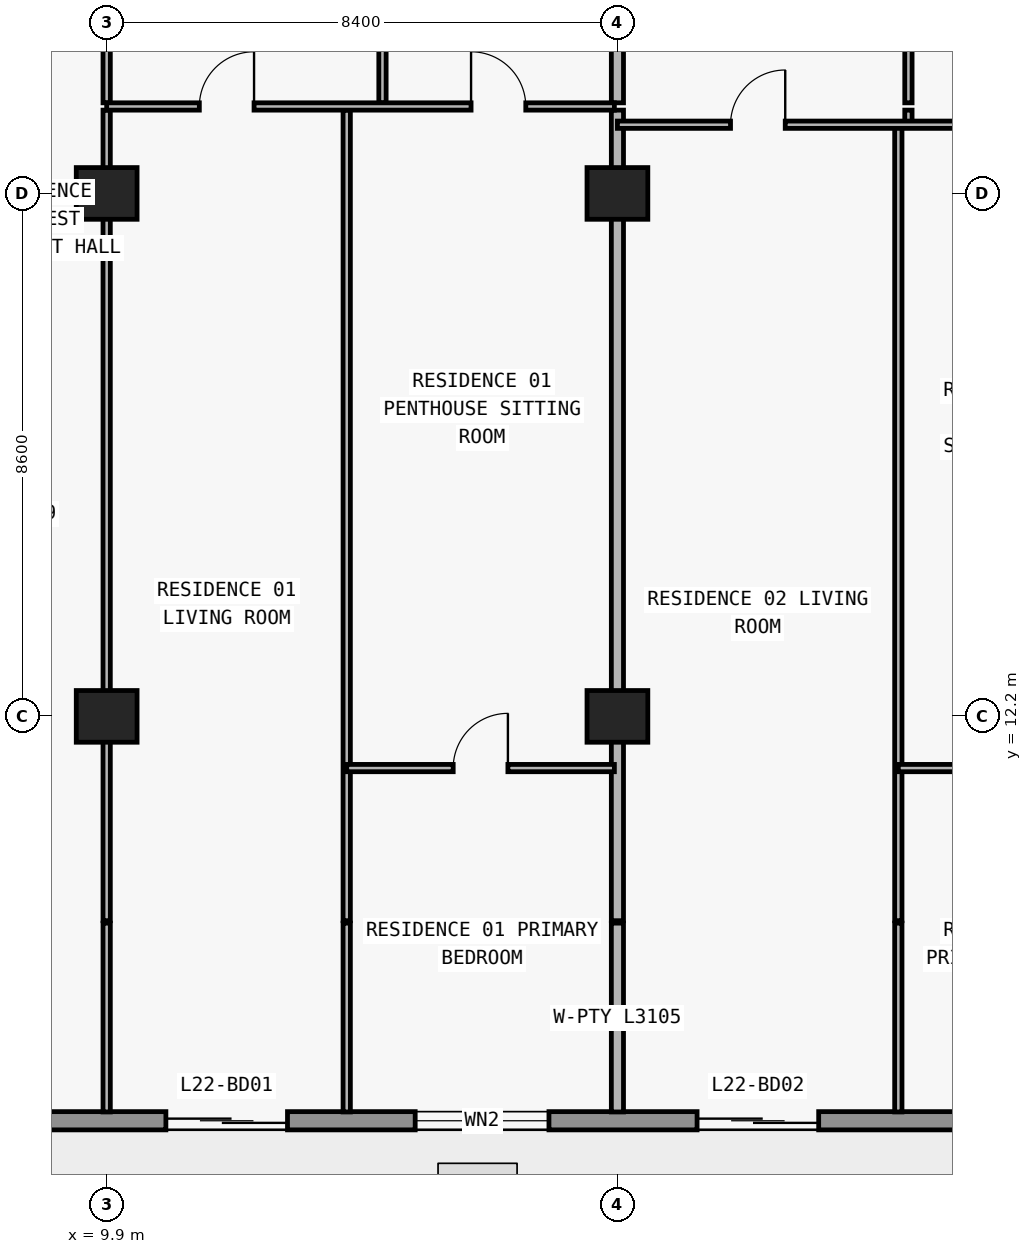
"""IFC4 building model, lengths in metres.
Left out: names, types, materials, properties, quantities, classifications, styles, units other than length and angle.
Written with IfcOpenShell. Run it as: python <this file> out.ifc"""

import sys

from ifc_helpers import new_model, si_unit, direction, frame, frame_2d, origin, origin_2d, place, context, subcontext, project, spatial, rectangle, extrude, element, fill, save


model = new_model("IFC4")
c1 = context("Model", 3, precision=1e-05, world=origin(), true_north=direction((0.0, 1.0)))
c2 = subcontext(c1, "Body", "Model", "MODEL_VIEW")
j1 = project(units=[si_unit("LENGTHUNIT", "METRE"), si_unit("PLANEANGLEUNIT", "RADIAN")], contexts=[c1])
p1 = place(None, origin())
s1 = spatial("IfcSite", under=j1, at=p1, CompositionType="ELEMENT")
p2 = place(p1, origin())
s2 = spatial("IfcBuilding", under=s1, at=p2, CompositionType="ELEMENT")
p3 = place(p2, frame((0.0, 0.0, 84.6)))
s3 = spatial("IfcBuildingStorey", under=s2, at=p3, CompositionType="ELEMENT", Elevation=84.6)
for number, where, z_axis, x_axis in (
    (1, (9.9, 12.2, 0.0), (0.0, 0.0, 1.0), (1.0, 0.0, 0.0)),
    (2, (18.3, 12.2, 0.0), (0.0, 0.0, 1.0), (1.0, 0.0, 0.0)),
    (3, (9.9, 20.8, 0.0), (0.0, 0.0, 1.0), (1.0, 0.0, 0.0)),
    (4, (18.3, 20.8, 0.0), (0.0, 0.0, 1.0), (1.0, 0.0, 0.0)),
):
    element("IfcColumn", number, at=place(p3, frame(where, z_axis=z_axis, x_axis=x_axis)), inside=s3, PredefinedType="COLUMN", context=c2, shape_type="SweptSolid", body=[
        extrude(rectangle(XDim=1.0, YDim=0.85, at=origin_2d()), origin(), (0.0, 0.0, 1.0), 3.05),
    ])
p4 = place(p3, frame((70.1, 5.55, 0.0), z_axis=(0.0, 0.0, 1.0), x_axis=(-1.0, 0.0, 0.0)))
e5 = element("IfcWall", 5, at=p4, inside=s3, PredefinedType="STANDARD", context=c2, shape_type="SweptSolid", body=[
    extrude(rectangle(XDim=62.4, YDim=0.3, at=frame_2d((31.2, 0.0))), origin(), (0.0, 0.0, 1.0), 3.05),
])
p5 = place(p4, frame((57.226, 0.0, 0.0)))
e6 = element("IfcOpeningElement", 6, at=p5, cuts=e5, PredefinedType="OPENING", context=c2, shape_type="SweptSolid", body=[
    extrude(rectangle(XDim=2.0, YDim=2.3, at=frame_2d((1.0, 1.15))), frame((0.0, 0.16, 0.0), z_axis=(0.0, -1.0, 0.0), x_axis=(1.0, 0.0, 0.0)), (0.0, 0.0, 1.0), 0.32),
])
p6 = place(p4, frame((52.926, 0.0, 0.85)))
e7 = element("IfcOpeningElement", 7, at=p6, cuts=e5, PredefinedType="OPENING", context=c2, shape_type="SweptSolid", body=[
    extrude(rectangle(XDim=2.2, YDim=1.55, at=frame_2d((1.1, 0.775))), frame((0.0, 0.16, 0.0), z_axis=(0.0, -1.0, 0.0), x_axis=(1.0, 0.0, 0.0)), (0.0, 0.0, 1.0), 0.32),
])
p7 = place(p4, frame((48.49, 0.0, 0.0)))
e8 = element("IfcOpeningElement", 8, at=p7, cuts=e5, PredefinedType="OPENING", context=c2, shape_type="SweptSolid", body=[
    extrude(rectangle(XDim=2.0, YDim=2.3, at=frame_2d((1.0, 1.15))), frame((0.0, 0.16, 0.0), z_axis=(0.0, -1.0, 0.0), x_axis=(1.0, 0.0, 0.0)), (0.0, 0.0, 1.0), 0.32),
])
p8 = place(p4, frame((44.39, 0.0, 0.85)))
e9 = element("IfcOpeningElement", 9, at=p8, cuts=e5, PredefinedType="OPENING", context=c2, shape_type="SweptSolid", body=[
    extrude(rectangle(XDim=1.8, YDim=1.55, at=frame_2d((0.9, 0.775))), frame((0.0, 0.16, 0.0), z_axis=(0.0, -1.0, 0.0), x_axis=(1.0, 0.0, 0.0)), (0.0, 0.0, 1.0), 0.32),
])
p9 = place(p4, frame((40.426, 0.0, 0.0)))
e10 = element("IfcOpeningElement", 10, at=p9, cuts=e5, PredefinedType="OPENING", context=c2, shape_type="SweptSolid", body=[
    extrude(rectangle(XDim=2.0, YDim=2.3, at=frame_2d((1.0, 1.15))), frame((0.0, 0.16, 0.0), z_axis=(0.0, -1.0, 0.0), x_axis=(1.0, 0.0, 0.0)), (0.0, 0.0, 1.0), 0.32),
])
p10 = place(p4, frame((36.126, 0.0, 0.85)))
e11 = element("IfcOpeningElement", 11, at=p10, cuts=e5, PredefinedType="OPENING", context=c2, shape_type="SweptSolid", body=[
    extrude(rectangle(XDim=2.2, YDim=1.55, at=frame_2d((1.1, 0.775))), frame((0.0, 0.16, 0.0), z_axis=(0.0, -1.0, 0.0), x_axis=(1.0, 0.0, 0.0)), (0.0, 0.0, 1.0), 0.32),
])
p11 = place(p4, frame((32.09, 0.0, 0.0)))
e12 = element("IfcOpeningElement", 12, at=p11, cuts=e5, PredefinedType="OPENING", context=c2, shape_type="SweptSolid", body=[
    extrude(rectangle(XDim=2.0, YDim=2.3, at=frame_2d((1.0, 1.15))), frame((0.0, 0.16, 0.0), z_axis=(0.0, -1.0, 0.0), x_axis=(1.0, 0.0, 0.0)), (0.0, 0.0, 1.0), 0.32),
])
p12 = place(p4, frame((28.21, 0.0, 0.65)))
e13 = element("IfcOpeningElement", 13, at=p12, cuts=e5, PredefinedType="OPENING", context=c2, shape_type="SweptSolid", body=[
    extrude(rectangle(XDim=2.6, YDim=1.85, at=frame_2d((1.3, 0.925))), frame((0.0, 0.16, 0.0), z_axis=(0.0, -1.0, 0.0), x_axis=(1.0, 0.0, 0.0)), (0.0, 0.0, 1.0), 0.32),
])
p13 = place(p4, frame((22.1, 0.0, 0.85)))
e14 = element("IfcOpeningElement", 14, at=p13, cuts=e5, PredefinedType="OPENING", context=c2, shape_type="SweptSolid", body=[
    extrude(rectangle(XDim=2.2, YDim=1.55, at=frame_2d((1.1, 0.775))), frame((0.0, 0.16, 0.0), z_axis=(0.0, -1.0, 0.0), x_axis=(1.0, 0.0, 0.0)), (0.0, 0.0, 1.0), 0.32),
])
p14 = place(p4, frame((16.026, 0.0, 0.0)))
e15 = element("IfcOpeningElement", 15, at=p14, cuts=e5, PredefinedType="OPENING", context=c2, shape_type="SweptSolid", body=[
    extrude(rectangle(XDim=2.0, YDim=2.3, at=frame_2d((1.0, 1.15))), frame((0.0, 0.16, 0.0), z_axis=(0.0, -1.0, 0.0), x_axis=(1.0, 0.0, 0.0)), (0.0, 0.0, 1.0), 0.32),
])
p15 = place(p4, frame((11.726, 0.0, 0.85)))
e16 = element("IfcOpeningElement", 16, at=p15, cuts=e5, PredefinedType="OPENING", context=c2, shape_type="SweptSolid", body=[
    extrude(rectangle(XDim=2.2, YDim=1.55, at=frame_2d((1.1, 0.775))), frame((0.0, 0.16, 0.0), z_axis=(0.0, -1.0, 0.0), x_axis=(1.0, 0.0, 0.0)), (0.0, 0.0, 1.0), 0.32),
])
p16 = place(p4, frame((7.29, 0.0, 0.0)))
e17 = element("IfcOpeningElement", 17, at=p16, cuts=e5, PredefinedType="OPENING", context=c2, shape_type="SweptSolid", body=[
    extrude(rectangle(XDim=2.0, YDim=2.3, at=frame_2d((1.0, 1.15))), frame((0.0, 0.16, 0.0), z_axis=(0.0, -1.0, 0.0), x_axis=(1.0, 0.0, 0.0)), (0.0, 0.0, 1.0), 0.32),
])
p17 = place(p4, frame((3.19, 0.0, 0.85)))
e18 = element("IfcOpeningElement", 18, at=p17, cuts=e5, PredefinedType="OPENING", context=c2, shape_type="SweptSolid", body=[
    extrude(rectangle(XDim=1.8, YDim=1.55, at=frame_2d((0.9, 0.775))), frame((0.0, 0.16, 0.0), z_axis=(0.0, -1.0, 0.0), x_axis=(1.0, 0.0, 0.0)), (0.0, 0.0, 1.0), 0.32),
])
p18 = place(p3, frame((9.9, 5.695, 0.0), z_axis=(0.0, 0.0, 1.0), x_axis=(0.0, 1.0, 0.0)))
e19 = element("IfcWall", 19, at=p18, inside=s3, PredefinedType="PARTITIONING", context=c2, shape_type="SweptSolid", body=[
    extrude(rectangle(XDim=3.105, YDim=0.12, at=frame_2d((1.552, 0.0))), origin(), (0.0, 0.0, 1.0), 3.05),
])
p19 = place(p3, frame((9.9, 8.84, 0.0), z_axis=(0.0, 0.0, 1.0), x_axis=(0.0, 1.0, 0.0)))
e20 = element("IfcWall", 20, at=p19, inside=s3, PredefinedType="PARTITIONING", context=c2, shape_type="SweptSolid", body=[
    extrude(rectangle(XDim=13.33, YDim=0.12, at=frame_2d((6.665, 0.0))), origin(), (0.0, 0.0, 1.0), 2.174),
])
p20 = place(p3, frame((9.9, 22.29, 0.0), z_axis=(0.0, 0.0, 1.0), x_axis=(0.0, 1.0, 0.0)))
e21 = element("IfcWall", 21, at=p20, inside=s3, PredefinedType="PARTITIONING", context=c2, shape_type="SweptSolid", body=[
    extrude(rectangle(XDim=4.69, YDim=0.12, at=frame_2d((2.345, 0.0))), origin(), (0.0, 0.0, 1.0), 2.174),
])
p21 = place(p20, frame((1.895, 0.0, 0.0)))
e22 = element("IfcOpeningElement", 22, at=p21, cuts=e21, PredefinedType="OPENING", context=c2, shape_type="SweptSolid", body=[
    extrude(rectangle(XDim=0.9, YDim=2.124, at=frame_2d((0.45, 1.062))), frame((0.0, 0.07, 0.0), z_axis=(0.0, -1.0, 0.0), x_axis=(1.0, 0.0, 0.0)), (0.0, 0.0, 1.0), 0.14),
])
p22 = place(p3, frame((13.848, 5.695, 0.0), z_axis=(0.0, 0.0, 1.0), x_axis=(0.0, 1.0, 0.0)))
e23 = element("IfcWall", 23, at=p22, inside=s3, PredefinedType="PARTITIONING", context=c2, shape_type="SweptSolid", body=[
    extrude(rectangle(XDim=3.105, YDim=0.12, at=frame_2d((1.552, 0.0))), origin(), (0.0, 0.0, 1.0), 3.05),
])
p23 = place(p3, frame((13.848, 8.84, 0.0), z_axis=(0.0, 0.0, 1.0), x_axis=(0.0, 1.0, 0.0)))
e24 = element("IfcWall", 24, at=p23, inside=s3, PredefinedType="PARTITIONING", context=c2, shape_type="SweptSolid", body=[
    extrude(rectangle(XDim=13.33, YDim=0.12, at=frame_2d((6.665, 0.0))), origin(), (0.0, 0.0, 1.0), 3.05),
])
p24 = place(p3, frame((14.436, 22.29, 0.0), z_axis=(0.0, 0.0, 1.0), x_axis=(0.0, 1.0, 0.0)))
e25 = element("IfcWall", 25, at=p24, inside=s3, PredefinedType="PARTITIONING", context=c2, shape_type="SweptSolid", body=[
    extrude(rectangle(XDim=4.69, YDim=0.12, at=frame_2d((2.345, 0.0))), origin(), (0.0, 0.0, 1.0), 3.05),
])
p25 = place(p24, frame((1.895, 0.0, 0.0)))
e26 = element("IfcOpeningElement", 26, at=p25, cuts=e25, PredefinedType="OPENING", context=c2, shape_type="SweptSolid", body=[
    extrude(rectangle(XDim=0.9, YDim=2.15, at=frame_2d((0.45, 1.075))), frame((0.0, 0.07, 0.0), z_axis=(0.0, -1.0, 0.0), x_axis=(1.0, 0.0, 0.0)), (0.0, 0.0, 1.0), 0.14),
])
p26 = place(p3, frame((18.3, 5.695, 0.0), z_axis=(0.0, 0.0, 1.0), x_axis=(0.0, 1.0, 0.0)))
e27 = element("IfcWall", 27, at=p26, inside=s3, PredefinedType="PARTITIONING", context=c2, shape_type="SweptSolid", body=[
    extrude(rectangle(XDim=3.105, YDim=0.2, at=frame_2d((1.552, 0.0))), origin(), (0.0, 0.0, 1.0), 3.05),
])
p27 = place(p3, frame((18.3, 8.84, 0.0), z_axis=(0.0, 0.0, 1.0), x_axis=(0.0, 1.0, 0.0)))
e28 = element("IfcWall", 28, at=p27, inside=s3, PredefinedType="PARTITIONING", context=c2, shape_type="SweptSolid", body=[
    extrude(rectangle(XDim=13.33, YDim=0.2, at=frame_2d((6.665, 0.0))), origin(), (0.0, 0.0, 1.0), 2.174),
])
p28 = place(p3, frame((18.3, 22.29, 0.0), z_axis=(0.0, 0.0, 1.0), x_axis=(0.0, 1.0, 0.0)))
e29 = element("IfcWall", 29, at=p28, inside=s3, PredefinedType="PARTITIONING", context=c2, shape_type="SweptSolid", body=[
    extrude(rectangle(XDim=4.69, YDim=0.2, at=frame_2d((2.345, 0.0))), origin(), (0.0, 0.0, 1.0), 2.174),
])
p29 = place(p3, frame((22.92, 5.695, 0.0), z_axis=(0.0, 0.0, 1.0), x_axis=(0.0, 1.0, 0.0)))
e30 = element("IfcWall", 30, at=p29, inside=s3, PredefinedType="PARTITIONING", context=c2, shape_type="SweptSolid", body=[
    extrude(rectangle(XDim=3.105, YDim=0.12, at=frame_2d((1.552, 0.0))), origin(), (0.0, 0.0, 1.0), 3.05),
])
p30 = place(p3, frame((22.92, 8.84, 0.0), z_axis=(0.0, 0.0, 1.0), x_axis=(0.0, 1.0, 0.0)))
e31 = element("IfcWall", 31, at=p30, inside=s3, PredefinedType="PARTITIONING", context=c2, shape_type="SweptSolid", body=[
    extrude(rectangle(XDim=13.09, YDim=0.12, at=frame_2d((6.545, 0.0))), origin(), (0.0, 0.0, 1.0), 3.05),
])
p31 = place(p3, frame((23.086, 21.935, 0.0), z_axis=(0.0, 0.0, 1.0), x_axis=(0.0, 1.0, 0.0)))
e32 = element("IfcWall", 32, at=p31, inside=s3, PredefinedType="PARTITIONING", context=c2, shape_type="SweptSolid", body=[
    extrude(rectangle(XDim=0.235, YDim=0.12, at=frame_2d((0.117, 0.0))), origin(), (0.0, 0.0, 1.0), 3.05),
])
p32 = place(p3, frame((23.086, 22.29, 0.0), z_axis=(0.0, 0.0, 1.0), x_axis=(0.0, 1.0, 0.0)))
e33 = element("IfcWall", 33, at=p32, inside=s3, PredefinedType="PARTITIONING", context=c2, shape_type="SweptSolid", body=[
    extrude(rectangle(XDim=4.69, YDim=0.12, at=frame_2d((2.345, 0.0))), origin(), (0.0, 0.0, 1.0), 3.05),
])
p33 = place(p32, frame((1.895, 0.0, 0.0)))
e34 = element("IfcOpeningElement", 34, at=p33, cuts=e33, PredefinedType="OPENING", context=c2, shape_type="SweptSolid", body=[
    extrude(rectangle(XDim=0.9, YDim=2.15, at=frame_2d((0.45, 1.075))), frame((0.0, 0.07, 0.0), z_axis=(0.0, -1.0, 0.0), x_axis=(1.0, 0.0, 0.0)), (0.0, 0.0, 1.0), 0.14),
])
p34 = place(p3, frame((13.848, 11.35, 0.0), z_axis=(0.0, 0.0, 1.0), x_axis=(1.0, 0.0, 0.0)))
e35 = element("IfcWall", 35, at=p34, inside=s3, PredefinedType="PARTITIONING", context=c2, shape_type="SweptSolid", body=[
    extrude(rectangle(XDim=4.402, YDim=0.12, at=frame_2d((2.201, 0.0))), origin(), (0.0, 0.0, 1.0), 3.05),
])
p35 = place(p34, frame((1.751, 0.0, 0.0)))
e36 = element("IfcOpeningElement", 36, at=p35, cuts=e35, PredefinedType="OPENING", context=c2, shape_type="SweptSolid", body=[
    extrude(rectangle(XDim=0.9, YDim=2.15, at=frame_2d((0.45, 1.075))), frame((0.0, 0.07, 0.0), z_axis=(0.0, -1.0, 0.0), x_axis=(1.0, 0.0, 0.0)), (0.0, 0.0, 1.0), 0.14),
])
p36 = place(p3, frame((22.92, 11.35, 0.0), z_axis=(0.0, 0.0, 1.0), x_axis=(1.0, 0.0, 0.0)))
e37 = element("IfcWall", 37, at=p36, inside=s3, PredefinedType="PARTITIONING", context=c2, shape_type="SweptSolid", body=[
    extrude(rectangle(XDim=3.73, YDim=0.12, at=frame_2d((1.865, 0.0))), origin(), (0.0, 0.0, 1.0), 3.05),
])
p37 = place(p36, frame((1.415, 0.0, 0.0)))
e38 = element("IfcOpeningElement", 38, at=p37, cuts=e37, PredefinedType="OPENING", context=c2, shape_type="SweptSolid", body=[
    extrude(rectangle(XDim=0.9, YDim=2.15, at=frame_2d((0.45, 1.075))), frame((0.0, 0.07, 0.0), z_axis=(0.0, -1.0, 0.0), x_axis=(1.0, 0.0, 0.0)), (0.0, 0.0, 1.0), 0.14),
])
p38 = place(p3, frame((18.3, 21.93, 0.0), z_axis=(0.0, 0.0, 1.0), x_axis=(1.0, 0.0, 0.0)))
e39 = element("IfcWall", 39, at=p38, inside=s3, PredefinedType="PARTITIONING", context=c2, shape_type="SweptSolid", body=[
    extrude(rectangle(XDim=8.13, YDim=0.12, at=frame_2d((4.065, 0.0))), origin(), (0.0, 0.0, 1.0), 3.05),
])
p39 = place(p38, frame((1.86, 0.0, 0.0)))
e40 = element("IfcOpeningElement", 40, at=p39, cuts=e39, PredefinedType="OPENING", context=c2, shape_type="SweptSolid", body=[
    extrude(rectangle(XDim=0.9, YDim=2.15, at=frame_2d((0.45, 1.075))), frame((0.0, 0.07, 0.0), z_axis=(0.0, -1.0, 0.0), x_axis=(1.0, 0.0, 0.0)), (0.0, 0.0, 1.0), 0.14),
])
p40 = place(p38, frame((6.008, 0.0, 0.0)))
e41 = element("IfcOpeningElement", 41, at=p40, cuts=e39, PredefinedType="OPENING", context=c2, shape_type="SweptSolid", body=[
    extrude(rectangle(XDim=0.9, YDim=2.15, at=frame_2d((0.45, 1.075))), frame((0.0, 0.07, 0.0), z_axis=(0.0, -1.0, 0.0), x_axis=(1.0, 0.0, 0.0)), (0.0, 0.0, 1.0), 0.14),
])
p41 = place(p3, frame((9.9, 22.23, 0.0), z_axis=(0.0, 0.0, 1.0), x_axis=(1.0, 0.0, 0.0)))
e42 = element("IfcWall", 42, at=p41, inside=s3, PredefinedType="PARTITIONING", context=c2, shape_type="SweptSolid", body=[
    extrude(rectangle(XDim=8.35, YDim=0.12, at=frame_2d((4.175, 0.0))), origin(), (0.0, 0.0, 1.0), 3.05),
])
p42 = place(p41, frame((1.524, 0.0, 0.0)))
e43 = element("IfcOpeningElement", 43, at=p42, cuts=e42, PredefinedType="OPENING", context=c2, shape_type="SweptSolid", body=[
    extrude(rectangle(XDim=0.9, YDim=2.15, at=frame_2d((0.45, 1.075))), frame((0.0, 0.07, 0.0), z_axis=(0.0, -1.0, 0.0), x_axis=(1.0, 0.0, 0.0)), (0.0, 0.0, 1.0), 0.14),
])
p43 = place(p41, frame((5.993, 0.0, 0.0)))
e44 = element("IfcOpeningElement", 44, at=p43, cuts=e42, PredefinedType="OPENING", context=c2, shape_type="SweptSolid", body=[
    extrude(rectangle(XDim=0.9, YDim=2.15, at=frame_2d((0.45, 1.075))), frame((0.0, 0.07, 0.0), z_axis=(0.0, -1.0, 0.0), x_axis=(1.0, 0.0, 0.0)), (0.0, 0.0, 1.0), 0.14),
])
p44 = place(p5, origin())
e45 = element("IfcDoor", 45, at=p44, inside=s3, OperationType="DOUBLE_DOOR_SLIDING", PredefinedType="DOOR", context=c2, shape_type="SweptSolid", body=[
    extrude(rectangle(XDim=2.0, YDim=2.3, at=frame_2d((1.0, 1.15))), frame((0.0, 0.025, 0.0), z_axis=(0.0, -1.0, 0.0), x_axis=(1.0, 0.0, 0.0)), (0.0, 0.0, 1.0), 0.05),
])
fill(e6, e45)
p45 = place(p6, origin())
e46 = element("IfcWindow", 46, at=p45, inside=s3, PartitioningType="SINGLE_PANEL", PredefinedType="WINDOW", context=c2, shape_type="SweptSolid", body=[
    extrude(rectangle(XDim=2.2, YDim=1.55, at=frame_2d((1.1, 0.775))), frame((0.0, 0.03, 0.0), z_axis=(0.0, -1.0, 0.0), x_axis=(1.0, 0.0, 0.0)), (0.0, 0.0, 1.0), 0.06),
])
fill(e7, e46)
p46 = place(p7, origin())
e47 = element("IfcDoor", 47, at=p46, inside=s3, OperationType="DOUBLE_DOOR_SLIDING", PredefinedType="DOOR", context=c2, shape_type="SweptSolid", body=[
    extrude(rectangle(XDim=2.0, YDim=2.3, at=frame_2d((1.0, 1.15))), frame((0.0, 0.025, 0.0), z_axis=(0.0, -1.0, 0.0), x_axis=(1.0, 0.0, 0.0)), (0.0, 0.0, 1.0), 0.05),
])
fill(e8, e47)
p47 = place(p42, origin())
e48 = element("IfcDoor", 48, at=p47, inside=s3, OperationType="SINGLE_SWING_RIGHT", PredefinedType="DOOR", context=c2, shape_type="SweptSolid", body=[
    extrude(rectangle(XDim=0.9, YDim=2.15, at=frame_2d((0.45, 1.075))), frame((0.0, 0.025, 0.0), z_axis=(0.0, -1.0, 0.0), x_axis=(1.0, 0.0, 0.0)), (0.0, 0.0, 1.0), 0.05),
])
fill(e43, e48)
p48 = place(p43, origin())
e49 = element("IfcDoor", 49, at=p48, inside=s3, OperationType="SINGLE_SWING_LEFT", PredefinedType="DOOR", context=c2, shape_type="SweptSolid", body=[
    extrude(rectangle(XDim=0.9, YDim=2.15, at=frame_2d((0.45, 1.075))), frame((0.0, 0.025, 0.0), z_axis=(0.0, -1.0, 0.0), x_axis=(1.0, 0.0, 0.0)), (0.0, 0.0, 1.0), 0.05),
])
fill(e44, e49)
p49 = place(p35, origin())
e50 = element("IfcDoor", 50, at=p49, inside=s3, OperationType="SINGLE_SWING_RIGHT", PredefinedType="DOOR", context=c2, shape_type="SweptSolid", body=[
    extrude(rectangle(XDim=0.9, YDim=2.15, at=frame_2d((0.45, 1.075))), frame((0.0, 0.025, 0.0), z_axis=(0.0, -1.0, 0.0), x_axis=(1.0, 0.0, 0.0)), (0.0, 0.0, 1.0), 0.05),
])
fill(e36, e50)
p50 = place(p39, origin())
e51 = element("IfcDoor", 51, at=p50, inside=s3, OperationType="SINGLE_SWING_RIGHT", PredefinedType="DOOR", context=c2, shape_type="SweptSolid", body=[
    extrude(rectangle(XDim=0.9, YDim=2.15, at=frame_2d((0.45, 1.075))), frame((0.0, 0.025, 0.0), z_axis=(0.0, -1.0, 0.0), x_axis=(1.0, 0.0, 0.0)), (0.0, 0.0, 1.0), 0.05),
])
fill(e40, e51)
save(model, sys.argv[1])
